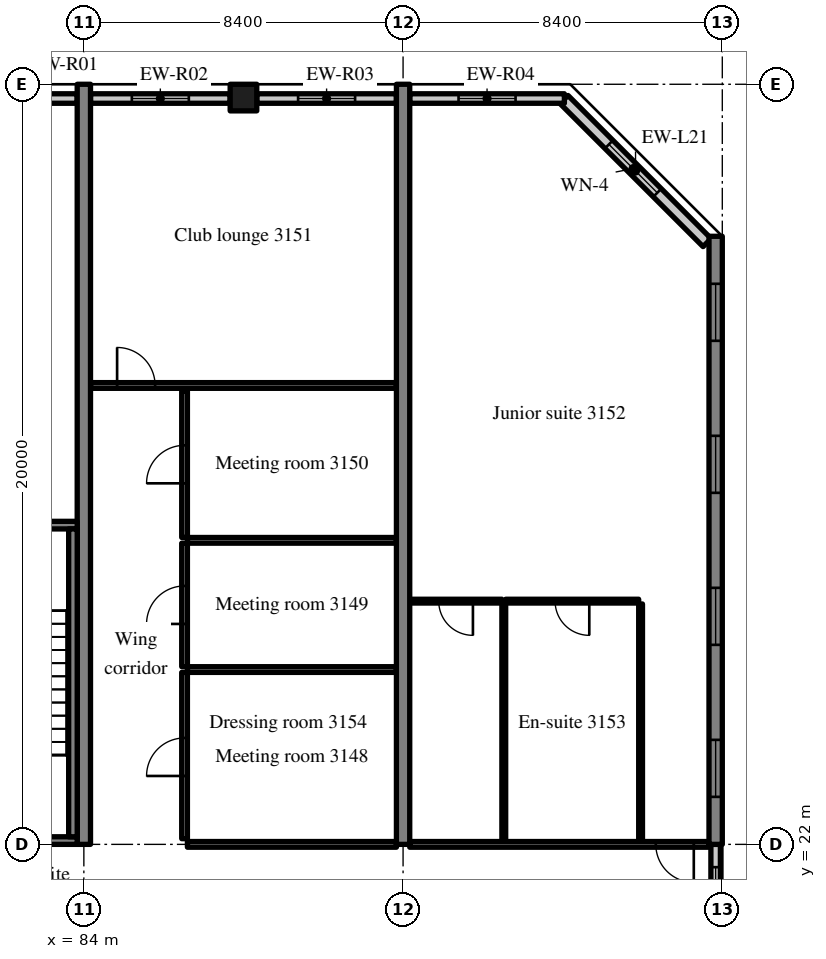
"""IFC4 building model, lengths in metres.
Left out: names, types, materials, properties, quantities, classifications, styles, units other than length and angle.
Written with IfcOpenShell. Run it as: python <this file> out.ifc"""

import sys

from ifc_helpers import new_model, si_unit, direction, frame, frame_2d, origin, origin_2d, place, context, subcontext, project, spatial, rectangle, extrude, source, transform, mapped, element, fill, save


model = new_model("IFC4")
c1 = context("Model", 3, precision=1e-05, world=origin(), true_north=direction((0.0, 1.0)))
c2 = subcontext(c1, "Body", "Model", "MODEL_VIEW")
j1 = project(units=[si_unit("LENGTHUNIT", "METRE"), si_unit("PLANEANGLEUNIT", "RADIAN")], contexts=[c1])
p1 = place(None, origin())
s1 = spatial("IfcSite", under=j1, at=p1, CompositionType="ELEMENT")
p2 = place(p1, origin())
s2 = spatial("IfcBuilding", under=s1, at=p2, CompositionType="ELEMENT")
p3 = place(p2, frame((0.0, 0.0, 129.4)))
s3 = spatial("IfcBuildingStorey", under=s2, at=p3, CompositionType="ELEMENT", Elevation=129.4)
m1 = source(origin(), c2, "Body", "SweptSolid", [
    extrude(rectangle(XDim=20.0, YDim=0.35, at=frame_2d((10.0, 0.0))), origin(), (0.0, 0.0, 1.0), 3.52),
])
for number, where, z_axis, x_axis in (
    (1, (84.0, 22.0, 0.0), (0.0, 0.0, 1.0), (0.0, 1.0, 0.0)),
    (2, (92.4, 22.0, 0.0), (0.0, 0.0, 1.0), (0.0, 1.0, 0.0)),
):
    element("IfcWall", number, at=place(p3, frame(where, z_axis=z_axis, x_axis=x_axis)), inside=s3, PredefinedType="SHEAR", context=c2, shape_type="MappedRepresentation", body=[
        mapped(m1, transform((0.0, 0.0, 0.0), scale=1.0)),
    ])
m2 = source(origin(), c2, "Body", "SweptSolid", [
    extrude(rectangle(XDim=16.0, YDim=0.35, at=frame_2d((8.0, 0.0))), origin(), (0.0, 0.0, 1.0), 3.52),
])
p4 = place(p3, frame((100.625, 22.0, 0.0), z_axis=(0.0, 0.0, 1.0), x_axis=(0.0, 1.0, 0.0)))
e3 = element("IfcWall", 3, at=p4, inside=s3, PredefinedType="SHEAR", context=c2, shape_type="MappedRepresentation", body=[
    mapped(m2, transform((0.0, 0.0, 0.0), scale=1.0)),
])
m3 = source(origin(), c2, "Body", "SweptSolid", [
    extrude(rectangle(XDim=1.5, YDim=1.5, at=frame_2d((0.75, 0.75))), frame((0.0, 0.185, 0.0), z_axis=(0.0, -1.0, 0.0), x_axis=(1.0, 0.0, 0.0)), (0.0, 0.0, 1.0), 0.37),
])
p5 = place(p4, frame((1.25, 0.0, 0.9)))
e4 = element("IfcOpeningElement", 4, at=p5, cuts=e3, PredefinedType="OPENING", context=c2, shape_type="MappedRepresentation", body=[
    mapped(m3, transform((0.0, 0.0, 0.0), scale=1.0)),
])
p6 = place(p4, frame((5.25, 0.0, 0.9)))
e5 = element("IfcOpeningElement", 5, at=p6, cuts=e3, PredefinedType="OPENING", context=c2, shape_type="MappedRepresentation", body=[
    mapped(m3, transform((0.0, 0.0, 0.0), scale=1.0)),
])
p7 = place(p4, frame((9.25, 0.0, 0.9)))
e6 = element("IfcOpeningElement", 6, at=p7, cuts=e3, PredefinedType="OPENING", context=c2, shape_type="MappedRepresentation", body=[
    mapped(m3, transform((0.0, 0.0, 0.0), scale=1.0)),
])
p8 = place(p4, frame((13.25, 0.0, 0.9)))
e7 = element("IfcOpeningElement", 7, at=p8, cuts=e3, PredefinedType="OPENING", context=c2, shape_type="MappedRepresentation", body=[
    mapped(m3, transform((0.0, 0.0, 0.0), scale=1.0)),
])
m4 = source(origin(), c2, "Body", "SweptSolid", [
    extrude(rectangle(XDim=0.7, YDim=0.7, at=origin_2d()), origin(), (0.0, 0.0, 1.0), 3.52),
])
p9 = place(p3, frame((88.2, 41.65, 0.0), z_axis=(0.0, 0.0, 1.0), x_axis=(1.0, 0.0, 0.0)))
e8 = element("IfcColumn", 8, at=p9, inside=s3, PredefinedType="COLUMN", context=c2, shape_type="MappedRepresentation", body=[
    mapped(m4, transform((0.0, 0.0, 0.0), scale=1.0)),
])
m5 = source(origin(), c2, "Body", "SweptSolid", [
    extrude(rectangle(XDim=5.326, YDim=0.3, at=frame_2d((2.663, 0.0))), origin(), (0.0, 0.0, 1.0), 3.52),
])
p10 = place(p3, frame((100.4, 37.834, 0.0), z_axis=(0.0, 0.0, 1.0), x_axis=(-0.707083859269, 0.707129702361, 0.0)))
e9 = element("IfcWall", 9, at=p10, inside=s3, PredefinedType="SOLIDWALL", context=c2, shape_type="MappedRepresentation", body=[
    mapped(m5, transform((0.0, 0.0, 0.0), scale=1.0)),
])
m6 = source(origin(), c2, "Body", "SweptSolid", [
    extrude(rectangle(XDim=1.8, YDim=1.5, at=frame_2d((0.9, 0.75))), frame((0.0, 0.16, 0.0), z_axis=(0.0, -1.0, 0.0), x_axis=(1.0, 0.0, 0.0)), (0.0, 0.0, 1.0), 0.32),
])
p11 = place(p10, frame((1.854, 0.0, 0.9)))
e10 = element("IfcOpeningElement", 10, at=p11, cuts=e9, PredefinedType="OPENING", context=c2, shape_type="MappedRepresentation", body=[
    mapped(m6, transform((0.0, 0.0, 0.0), scale=1.0)),
])
m7 = source(origin(), c2, "Body", "SweptSolid", [
    extrude(rectangle(XDim=1.683, YDim=0.25, at=frame_2d((0.841, 0.0))), origin(), (0.0, 0.0, 1.0), 2.82),
])
p12 = place(p3, frame((83.825, 41.625, 0.0), z_axis=(0.0, 0.0, 1.0), x_axis=(-1.0, 0.0, 0.0)))
e11 = element("IfcWall", 11, at=p12, inside=s3, PredefinedType="SOLIDWALL", context=c2, shape_type="MappedRepresentation", body=[
    mapped(m7, transform((0.0, 0.0, 0.0), scale=1.0)),
])
m8 = source(origin(), c2, "Body", "SweptSolid", [
    extrude(rectangle(XDim=3.675, YDim=0.25, at=frame_2d((1.837, 0.0))), origin(), (0.0, 0.0, 1.0), 2.82),
])
p13 = place(p3, frame((87.85, 41.625, 0.0), z_axis=(0.0, 0.0, 1.0), x_axis=(-1.0, 0.0, 0.0)))
e12 = element("IfcWall", 12, at=p13, inside=s3, PredefinedType="SOLIDWALL", context=c2, shape_type="MappedRepresentation", body=[
    mapped(m8, transform((0.0, 0.0, 0.0), scale=1.0)),
])
m9 = source(origin(), c2, "Body", "SweptSolid", [
    extrude(rectangle(XDim=1.5, YDim=1.5, at=frame_2d((0.75, 0.75))), frame((0.0, 0.135, 0.0), z_axis=(0.0, -1.0, 0.0), x_axis=(1.0, 0.0, 0.0)), (0.0, 0.0, 1.0), 0.27),
])
p14 = place(p13, frame((1.087, 0.0, 0.9)))
e13 = element("IfcOpeningElement", 13, at=p14, cuts=e12, PredefinedType="OPENING", context=c2, shape_type="MappedRepresentation", body=[
    mapped(m9, transform((0.0, 0.0, 0.0), scale=1.0)),
])
p15 = place(p3, frame((92.225, 41.625, 0.0), z_axis=(0.0, 0.0, 1.0), x_axis=(-1.0, 0.0, 0.0)))
e14 = element("IfcWall", 14, at=p15, inside=s3, PredefinedType="SOLIDWALL", context=c2, shape_type="MappedRepresentation", body=[
    mapped(m8, transform((0.0, 0.0, 0.0), scale=1.0)),
])
p16 = place(p15, frame((1.087, 0.0, 0.9)))
e15 = element("IfcOpeningElement", 15, at=p16, cuts=e14, PredefinedType="OPENING", context=c2, shape_type="MappedRepresentation", body=[
    mapped(m9, transform((0.0, 0.0, 0.0), scale=1.0)),
])
m10 = source(origin(), c2, "Body", "SweptSolid", [
    extrude(rectangle(XDim=4.07, YDim=0.25, at=frame_2d((2.035, 0.0))), origin(), (0.0, 0.0, 1.0), 2.82),
])
p17 = place(p3, frame((96.645, 41.625, 0.0), z_axis=(0.0, 0.0, 1.0), x_axis=(-1.0, 0.0, 0.0)))
e16 = element("IfcWall", 16, at=p17, inside=s3, PredefinedType="SOLIDWALL", context=c2, shape_type="MappedRepresentation", body=[
    mapped(m10, transform((0.0, 0.0, 0.0), scale=1.0)),
])
p18 = place(p17, frame((1.285, 0.0, 0.9)))
e17 = element("IfcOpeningElement", 17, at=p18, cuts=e16, PredefinedType="OPENING", context=c2, shape_type="MappedRepresentation", body=[
    mapped(m9, transform((0.0, 0.0, 0.0), scale=1.0)),
])
m11 = source(origin(), c2, "Body", "SweptSolid", [
    extrude(rectangle(XDim=2.4, YDim=0.25, at=frame_2d((1.2, 0.0))), origin(), (0.0, 0.0, 1.0), 2.62),
])
p19 = place(p3, frame((100.625, 19.6, 0.0), z_axis=(0.0, 0.0, 1.0), x_axis=(0.0, 1.0, 0.0)))
e18 = element("IfcWall", 18, at=p19, inside=s3, PredefinedType="SOLIDWALL", context=c2, shape_type="MappedRepresentation", body=[
    mapped(m11, transform((0.0, 0.0, 0.0), scale=1.0)),
])
m12 = source(origin(), c2, "Body", "SweptSolid", [
    extrude(rectangle(XDim=1.2, YDim=1.5, at=frame_2d((0.6, 0.75))), frame((0.0, 0.135, 0.0), z_axis=(0.0, -1.0, 0.0), x_axis=(1.0, 0.0, 0.0)), (0.0, 0.0, 1.0), 0.27),
])
p20 = place(p19, frame((0.6, 0.0, 0.9)))
e19 = element("IfcOpeningElement", 19, at=p20, cuts=e18, PredefinedType="OPENING", context=c2, shape_type="MappedRepresentation", body=[
    mapped(m12, transform((0.0, 0.0, 0.0), scale=1.0)),
])
m13 = source(origin(), c2, "Body", "SweptSolid", [
    extrude(rectangle(XDim=8.225, YDim=0.2, at=frame_2d((4.112, 0.0))), origin(), (0.0, 0.0, 1.0), 3.52),
])
p21 = place(p3, frame((83.825, 22.1, 0.0), z_axis=(0.0, 0.0, 1.0), x_axis=(-1.0, 0.0, 0.0)))
e20 = element("IfcWall", 20, at=p21, inside=s3, PredefinedType="SOLIDWALL", context=c2, shape_type="MappedRepresentation", body=[
    mapped(m13, transform((0.0, 0.0, 0.0), scale=1.0)),
])
m14 = source(origin(), c2, "Body", "SweptSolid", [
    extrude(rectangle(XDim=1.2, YDim=2.1, at=frame_2d((0.6, 1.05))), frame((0.0, 0.11, 0.0), z_axis=(0.0, -1.0, 0.0), x_axis=(1.0, 0.0, 0.0)), (0.0, 0.0, 1.0), 0.22),
])
p22 = place(p21, frame((6.025, 0.0, 0.0)))
e21 = element("IfcOpeningElement", 21, at=p22, cuts=e20, PredefinedType="OPENING", context=c2, shape_type="MappedRepresentation", body=[
    mapped(m14, transform((0.0, 0.0, 0.0), scale=1.0)),
])
p23 = place(p3, frame((83.825, 30.4, 0.0), z_axis=(0.0, 0.0, 1.0), x_axis=(-1.0, 0.0, 0.0)))
e22 = element("IfcWall", 22, at=p23, inside=s3, PredefinedType="SOLIDWALL", context=c2, shape_type="MappedRepresentation", body=[
    mapped(m13, transform((0.0, 0.0, 0.0), scale=1.0)),
])
m15 = source(origin(), c2, "Body", "SweptSolid", [
    extrude(rectangle(XDim=1.0, YDim=2.1, at=frame_2d((0.5, 1.05))), frame((0.0, 0.11, 0.0), z_axis=(0.0, -1.0, 0.0), x_axis=(1.0, 0.0, 0.0)), (0.0, 0.0, 1.0), 0.22),
])
p24 = place(p23, frame((6.125, 0.0, 0.0)))
e23 = element("IfcOpeningElement", 23, at=p24, cuts=e22, PredefinedType="OPENING", context=c2, shape_type="MappedRepresentation", body=[
    mapped(m15, transform((0.0, 0.0, 0.0), scale=1.0)),
])
m16 = source(origin(), c2, "Body", "SweptSolid", [
    extrude(rectangle(XDim=8.1, YDim=0.225, at=frame_2d((4.05, 0.0))), origin(), (0.0, 0.0, 1.0), 3.52),
])
p25 = place(p3, frame((83.713, 22.2, 0.0), z_axis=(0.0, 0.0, 1.0), x_axis=(0.0, 1.0, 0.0)))
e24 = element("IfcWall", 24, at=p25, inside=s3, PredefinedType="SOLIDWALL", context=c2, shape_type="MappedRepresentation", body=[
    mapped(m16, transform((0.0, 0.0, 0.0), scale=1.0)),
])
m17 = source(origin(), c2, "Body", "SweptSolid", [
    extrude(rectangle(XDim=5.5, YDim=0.15, at=frame_2d((2.75, 0.0))), origin(), (0.0, 0.0, 1.0), 2.82),
])
p26 = place(p3, frame((86.725, 22.0, 0.0), z_axis=(0.0, 0.0, 1.0), x_axis=(1.0, 0.0, 0.0)))
e25 = element("IfcWall", 25, at=p26, inside=s3, PredefinedType="PARTITIONING", context=c2, shape_type="MappedRepresentation", body=[
    mapped(m17, transform((0.0, 0.0, 0.0), scale=1.0)),
])
m18 = source(origin(), c2, "Body", "SweptSolid", [
    extrude(rectangle(XDim=4.375, YDim=0.15, at=frame_2d((2.188, 0.0))), origin(), (0.0, 0.0, 1.0), 3.52),
])
p27 = place(p3, frame((86.65, 22.15, 0.0), z_axis=(0.0, 0.0, 1.0), x_axis=(0.0, 1.0, 0.0)))
e26 = element("IfcWall", 26, at=p27, inside=s3, PredefinedType="PARTITIONING", context=c2, shape_type="MappedRepresentation", body=[
    mapped(m18, transform((0.0, 0.0, 0.0), scale=1.0)),
])
m19 = source(origin(), c2, "Body", "SweptSolid", [
    extrude(rectangle(XDim=1.0, YDim=2.1, at=frame_2d((0.5, 1.05))), frame((0.0, 0.085, 0.0), z_axis=(0.0, -1.0, 0.0), x_axis=(1.0, 0.0, 0.0)), (0.0, 0.0, 1.0), 0.17),
])
p28 = place(p27, frame((1.65, 0.0, 0.0)))
e27 = element("IfcOpeningElement", 27, at=p28, cuts=e26, PredefinedType="OPENING", context=c2, shape_type="MappedRepresentation", body=[
    mapped(m19, transform((0.0, 0.0, 0.0), scale=1.0)),
])
m20 = source(origin(), c2, "Body", "SweptSolid", [
    extrude(rectangle(XDim=5.5, YDim=0.15, at=frame_2d((2.75, 0.0))), origin(), (0.0, 0.0, 1.0), 3.52),
])
p29 = place(p3, frame((86.725, 26.6, 0.0), z_axis=(0.0, 0.0, 1.0), x_axis=(1.0, 0.0, 0.0)))
e28 = element("IfcWall", 28, at=p29, inside=s3, PredefinedType="PARTITIONING", context=c2, shape_type="MappedRepresentation", body=[
    mapped(m20, transform((0.0, 0.0, 0.0), scale=1.0)),
])
m21 = source(origin(), c2, "Body", "SweptSolid", [
    extrude(rectangle(XDim=3.25, YDim=0.15, at=frame_2d((1.625, 0.0))), origin(), (0.0, 0.0, 1.0), 3.52),
])
p30 = place(p3, frame((86.65, 26.675, 0.0), z_axis=(0.0, 0.0, 1.0), x_axis=(0.0, 1.0, 0.0)))
e29 = element("IfcWall", 29, at=p30, inside=s3, PredefinedType="PARTITIONING", context=c2, shape_type="MappedRepresentation", body=[
    mapped(m21, transform((0.0, 0.0, 0.0), scale=1.0)),
])
p31 = place(p30, frame((1.125, 0.0, 0.0)))
e30 = element("IfcOpeningElement", 30, at=p31, cuts=e29, PredefinedType="OPENING", context=c2, shape_type="MappedRepresentation", body=[
    mapped(m19, transform((0.0, 0.0, 0.0), scale=1.0)),
])
p32 = place(p3, frame((86.725, 30.0, 0.0), z_axis=(0.0, 0.0, 1.0), x_axis=(1.0, 0.0, 0.0)))
e31 = element("IfcWall", 31, at=p32, inside=s3, PredefinedType="PARTITIONING", context=c2, shape_type="MappedRepresentation", body=[
    mapped(m20, transform((0.0, 0.0, 0.0), scale=1.0)),
])
m22 = source(origin(), c2, "Body", "SweptSolid", [
    extrude(rectangle(XDim=3.85, YDim=0.15, at=frame_2d((1.925, 0.0))), origin(), (0.0, 0.0, 1.0), 3.52),
])
p33 = place(p3, frame((86.65, 30.075, 0.0), z_axis=(0.0, 0.0, 1.0), x_axis=(0.0, 1.0, 0.0)))
e32 = element("IfcWall", 32, at=p33, inside=s3, PredefinedType="PARTITIONING", context=c2, shape_type="MappedRepresentation", body=[
    mapped(m22, transform((0.0, 0.0, 0.0), scale=1.0)),
])
p34 = place(p33, frame((1.425, 0.0, 0.0)))
e33 = element("IfcOpeningElement", 33, at=p34, cuts=e32, PredefinedType="OPENING", context=c2, shape_type="MappedRepresentation", body=[
    mapped(m19, transform((0.0, 0.0, 0.0), scale=1.0)),
])
m23 = source(origin(), c2, "Body", "SweptSolid", [
    extrude(rectangle(XDim=8.05, YDim=0.15, at=frame_2d((4.025, 0.0))), origin(), (0.0, 0.0, 1.0), 3.52),
])
p35 = place(p3, frame((84.175, 34.075, 0.0), z_axis=(0.0, 0.0, 1.0), x_axis=(1.0, 0.0, 0.0)))
e34 = element("IfcWall", 34, at=p35, inside=s3, PredefinedType="PARTITIONING", context=c2, shape_type="MappedRepresentation", body=[
    mapped(m23, transform((0.0, 0.0, 0.0), scale=1.0)),
])
p36 = place(p35, frame((0.7, 0.0, 0.0)))
e35 = element("IfcOpeningElement", 35, at=p36, cuts=e34, PredefinedType="OPENING", context=c2, shape_type="MappedRepresentation", body=[
    mapped(m19, transform((0.0, 0.0, 0.0), scale=1.0)),
])
m24 = source(origin(), c2, "Body", "SweptSolid", [
    extrude(rectangle(XDim=6.25, YDim=0.1, at=frame_2d((3.125, 0.0))), origin(), (0.0, 0.0, 1.0), 3.52),
])
for number, where, z_axis, x_axis in (
    (36, (98.65, 22.075, 0.0), (0.0, 0.0, 1.0), (0.0, 1.0, 0.0)),
    (37, (95.05, 22.075, 0.0), (0.0, 0.0, 1.0), (0.0, 1.0, 0.0)),
):
    element("IfcWall", number, at=place(p3, frame(where, z_axis=z_axis, x_axis=x_axis)), inside=s3, PredefinedType="PARTITIONING", context=c2, shape_type="MappedRepresentation", body=[
        mapped(m24, transform((0.0, 0.0, 0.0), scale=1.0)),
    ])
m25 = source(origin(), c2, "Body", "SweptSolid", [
    extrude(rectangle(XDim=3.5, YDim=0.1, at=frame_2d((1.75, 0.0))), origin(), (0.0, 0.0, 1.0), 3.52),
])
p37 = place(p3, frame((95.1, 28.4, 0.0), z_axis=(0.0, 0.0, 1.0), x_axis=(1.0, 0.0, 0.0)))
e38 = element("IfcWall", 38, at=p37, inside=s3, PredefinedType="PARTITIONING", context=c2, shape_type="MappedRepresentation", body=[
    mapped(m25, transform((0.0, 0.0, 0.0), scale=1.0)),
])
m26 = source(origin(), c2, "Body", "SweptSolid", [
    extrude(rectangle(XDim=0.9, YDim=2.1, at=frame_2d((0.45, 1.05))), frame((0.0, 0.06, 0.0), z_axis=(0.0, -1.0, 0.0), x_axis=(1.0, 0.0, 0.0)), (0.0, 0.0, 1.0), 0.12),
])
p38 = place(p37, frame((1.3, 0.0, 0.0)))
e39 = element("IfcOpeningElement", 39, at=p38, cuts=e38, PredefinedType="OPENING", context=c2, shape_type="MappedRepresentation", body=[
    mapped(m26, transform((0.0, 0.0, 0.0), scale=1.0)),
])
m27 = source(origin(), c2, "Body", "SweptSolid", [
    extrude(rectangle(XDim=2.425, YDim=0.1, at=frame_2d((1.212, 0.0))), origin(), (0.0, 0.0, 1.0), 3.52),
])
p39 = place(p3, frame((92.575, 28.4, 0.0), z_axis=(0.0, 0.0, 1.0), x_axis=(1.0, 0.0, 0.0)))
e40 = element("IfcWall", 40, at=p39, inside=s3, PredefinedType="PARTITIONING", context=c2, shape_type="MappedRepresentation", body=[
    mapped(m27, transform((0.0, 0.0, 0.0), scale=1.0)),
])
p40 = place(p39, frame((0.763, 0.0, 0.0)))
e41 = element("IfcOpeningElement", 41, at=p40, cuts=e40, PredefinedType="OPENING", context=c2, shape_type="MappedRepresentation", body=[
    mapped(m26, transform((0.0, 0.0, 0.0), scale=1.0)),
])
m28 = source(origin(), c2, "Body", "SweptSolid", [
    extrude(rectangle(XDim=7.875, YDim=0.15, at=frame_2d((3.938, 0.0))), origin(), (0.0, 0.0, 1.0), 2.82),
])
p41 = place(p3, frame((92.575, 22.0, 0.0), z_axis=(0.0, 0.0, 1.0), x_axis=(1.0, 0.0, 0.0)))
e42 = element("IfcWall", 42, at=p41, inside=s3, PredefinedType="PARTITIONING", context=c2, shape_type="MappedRepresentation", body=[
    mapped(m28, transform((0.0, 0.0, 0.0), scale=1.0)),
])
p42 = place(p41, frame((6.475, 0.0, 0.0)))
e43 = element("IfcOpeningElement", 43, at=p42, cuts=e42, PredefinedType="OPENING", context=c2, shape_type="MappedRepresentation", body=[
    mapped(m19, transform((0.0, 0.0, 0.0), scale=1.0)),
])
m29 = source(origin(), c2, "Body", "SweptSolid", [
    extrude(rectangle(XDim=1.8, YDim=1.5, at=frame_2d((0.9, 0.75))), frame((0.0, 0.03, 0.0), z_axis=(0.0, -1.0, 0.0), x_axis=(1.0, 0.0, 0.0)), (0.0, 0.0, 1.0), 0.06),
])
p43 = place(p11, origin())
e44 = element("IfcWindow", 44, at=p43, inside=s3, PartitioningType="SINGLE_PANEL", PredefinedType="WINDOW", context=c2, shape_type="MappedRepresentation", body=[
    mapped(m29, transform((0.0, 0.0, 0.0), scale=1.0)),
])
fill(e10, e44)
m30 = source(origin(), c2, "Body", "SweptSolid", [
    extrude(rectangle(XDim=1.5, YDim=1.5, at=frame_2d((0.75, 0.75))), frame((0.0, 0.03, 0.0), z_axis=(0.0, -1.0, 0.0), x_axis=(1.0, 0.0, 0.0)), (0.0, 0.0, 1.0), 0.06),
])
p44 = place(p14, origin())
e45 = element("IfcWindow", 45, at=p44, inside=s3, PartitioningType="SINGLE_PANEL", PredefinedType="WINDOW", context=c2, shape_type="MappedRepresentation", body=[
    mapped(m30, transform((0.0, 0.0, 0.0), scale=1.0)),
])
fill(e13, e45)
p45 = place(p16, origin())
e46 = element("IfcWindow", 46, at=p45, inside=s3, PartitioningType="SINGLE_PANEL", PredefinedType="WINDOW", context=c2, shape_type="MappedRepresentation", body=[
    mapped(m30, transform((0.0, 0.0, 0.0), scale=1.0)),
])
fill(e15, e46)
p46 = place(p18, origin())
e47 = element("IfcWindow", 47, at=p46, inside=s3, PartitioningType="SINGLE_PANEL", PredefinedType="WINDOW", context=c2, shape_type="MappedRepresentation", body=[
    mapped(m30, transform((0.0, 0.0, 0.0), scale=1.0)),
])
fill(e17, e47)
p47 = place(p5, origin())
e48 = element("IfcWindow", 48, at=p47, inside=s3, PartitioningType="SINGLE_PANEL", PredefinedType="WINDOW", context=c2, shape_type="MappedRepresentation", body=[
    mapped(m30, transform((0.0, 0.0, 0.0), scale=1.0)),
])
fill(e4, e48)
p48 = place(p6, origin())
e49 = element("IfcWindow", 49, at=p48, inside=s3, PartitioningType="SINGLE_PANEL", PredefinedType="WINDOW", context=c2, shape_type="MappedRepresentation", body=[
    mapped(m30, transform((0.0, 0.0, 0.0), scale=1.0)),
])
fill(e5, e49)
p49 = place(p7, origin())
e50 = element("IfcWindow", 50, at=p49, inside=s3, PartitioningType="SINGLE_PANEL", PredefinedType="WINDOW", context=c2, shape_type="MappedRepresentation", body=[
    mapped(m30, transform((0.0, 0.0, 0.0), scale=1.0)),
])
fill(e6, e50)
p50 = place(p8, origin())
e51 = element("IfcWindow", 51, at=p50, inside=s3, PartitioningType="SINGLE_PANEL", PredefinedType="WINDOW", context=c2, shape_type="MappedRepresentation", body=[
    mapped(m30, transform((0.0, 0.0, 0.0), scale=1.0)),
])
fill(e7, e51)
m31 = source(origin(), c2, "Body", "SweptSolid", [
    extrude(rectangle(XDim=1.2, YDim=1.5, at=frame_2d((0.6, 0.75))), frame((0.0, 0.03, 0.0), z_axis=(0.0, -1.0, 0.0), x_axis=(1.0, 0.0, 0.0)), (0.0, 0.0, 1.0), 0.06),
])
p51 = place(p20, origin())
e52 = element("IfcWindow", 52, at=p51, inside=s3, PartitioningType="SINGLE_PANEL", PredefinedType="WINDOW", context=c2, shape_type="MappedRepresentation", body=[
    mapped(m31, transform((0.0, 0.0, 0.0), scale=1.0)),
])
fill(e19, e52)
m32 = source(origin(), c2, "Body", "SweptSolid", [
    extrude(rectangle(XDim=1.0, YDim=2.1, at=frame_2d((0.5, 1.05))), frame((0.0, 0.025, 0.0), z_axis=(0.0, -1.0, 0.0), x_axis=(1.0, 0.0, 0.0)), (0.0, 0.0, 1.0), 0.05),
])
p52 = place(p28, origin())
e53 = element("IfcDoor", 53, at=p52, inside=s3, OperationType="SINGLE_SWING_LEFT", PredefinedType="DOOR", context=c2, shape_type="MappedRepresentation", body=[
    mapped(m32, transform((0.0, 0.0, 0.0), scale=1.0)),
])
fill(e27, e53)
p53 = place(p31, origin())
e54 = element("IfcDoor", 54, at=p53, inside=s3, OperationType="SINGLE_SWING_LEFT", PredefinedType="DOOR", context=c2, shape_type="MappedRepresentation", body=[
    mapped(m32, transform((0.0, 0.0, 0.0), scale=1.0)),
])
fill(e30, e54)
p54 = place(p34, origin())
e55 = element("IfcDoor", 55, at=p54, inside=s3, OperationType="SINGLE_SWING_LEFT", PredefinedType="DOOR", context=c2, shape_type="MappedRepresentation", body=[
    mapped(m32, transform((0.0, 0.0, 0.0), scale=1.0)),
])
fill(e33, e55)
p55 = place(p36, origin())
e56 = element("IfcDoor", 56, at=p55, inside=s3, OperationType="SINGLE_SWING_LEFT", PredefinedType="DOOR", context=c2, shape_type="MappedRepresentation", body=[
    mapped(m32, transform((0.0, 0.0, 0.0), scale=1.0)),
])
fill(e35, e56)
m33 = source(origin(), c2, "Body", "SweptSolid", [
    extrude(rectangle(XDim=0.9, YDim=2.1, at=frame_2d((0.45, 1.05))), frame((0.0, 0.025, 0.0), z_axis=(0.0, -1.0, 0.0), x_axis=(1.0, 0.0, 0.0)), (0.0, 0.0, 1.0), 0.05),
])
p56 = place(p38, origin())
e57 = element("IfcDoor", 57, at=p56, inside=s3, OperationType="SINGLE_SWING_RIGHT", PredefinedType="DOOR", context=c2, shape_type="MappedRepresentation", body=[
    mapped(m33, transform((0.0, 0.0, 0.0), scale=1.0)),
])
fill(e39, e57)
p57 = place(p40, origin())
e58 = element("IfcDoor", 58, at=p57, inside=s3, OperationType="SINGLE_SWING_RIGHT", PredefinedType="DOOR", context=c2, shape_type="MappedRepresentation", body=[
    mapped(m33, transform((0.0, 0.0, 0.0), scale=1.0)),
])
fill(e41, e58)
p58 = place(p42, origin())
e59 = element("IfcDoor", 59, at=p58, inside=s3, OperationType="SINGLE_SWING_RIGHT", PredefinedType="DOOR", context=c2, shape_type="MappedRepresentation", body=[
    mapped(m32, transform((0.0, 0.0, 0.0), scale=1.0)),
])
fill(e43, e59)
save(model, sys.argv[1])
